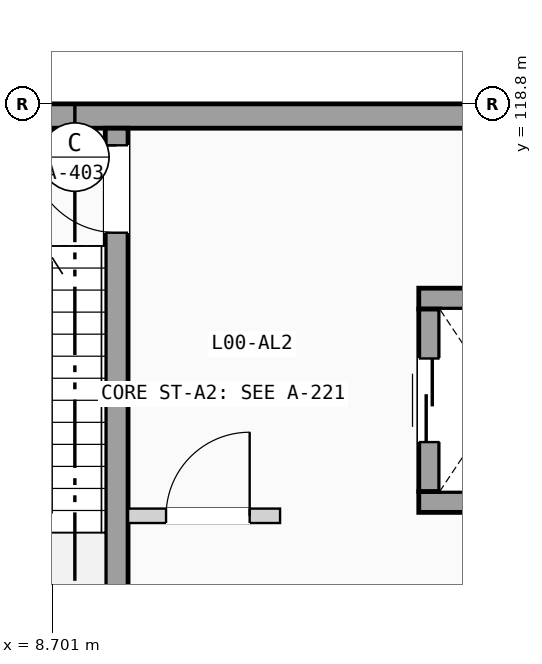
"""IFC4 building model, lengths in metres.
Left out: names, types, materials, properties, quantities, classifications, styles, units other than length and angle.
Written with IfcOpenShell. Run it as: python <this file> out.ifc"""

import sys

from ifc_helpers import new_model, si_unit, direction, frame, frame_2d, origin, place, context, subcontext, project, spatial, rectangle, extrude, element, fill, save


model = new_model("IFC4")
c1 = context("Model", 3, precision=1e-05, world=origin(), true_north=direction((0.0, 1.0)))
c2 = subcontext(c1, "Body", "Model", "MODEL_VIEW")
j1 = project(units=[si_unit("LENGTHUNIT", "METRE"), si_unit("PLANEANGLEUNIT", "RADIAN")], contexts=[c1])
p1 = place(None, origin())
s1 = spatial("IfcSite", under=j1, at=p1, CompositionType="ELEMENT")
p2 = place(p1, origin())
s2 = spatial("IfcBuilding", under=s1, at=p2, CompositionType="ELEMENT")
p3 = place(p2, origin())
s3 = spatial("IfcBuildingStorey", under=s2, at=p3, CompositionType="ELEMENT", Elevation=0.0)
p4 = place(p3, frame((0.0, 118.64, 0.0), z_axis=(0.0, 0.0, 1.0), x_axis=(1.0, 0.0, 0.0)))
e1 = element("IfcWall", 1, at=p4, inside=s3, PredefinedType="SOLIDWALL", context=c2, shape_type="SweptSolid", body=[
    extrude(rectangle(XDim=21.6, YDim=0.32, at=frame_2d((10.8, 0.0))), origin(), (0.0, 0.0, 1.0), 4.64),
])
p5 = place(p4, frame((7.25, 0.0, 0.0)))
e2 = element("IfcOpeningElement", 2, at=p5, cuts=e1, PredefinedType="OPENING", context=c2, shape_type="SweptSolid", body=[
    extrude(rectangle(XDim=1.3, YDim=2.2, at=frame_2d((0.65, 1.1))), frame((0.0, 0.17, 0.0), z_axis=(0.0, -1.0, 0.0), x_axis=(1.0, 0.0, 0.0)), (0.0, 0.0, 1.0), 0.34),
])
p6 = place(p3, frame((9.55, 111.48, 0.0), z_axis=(0.0, 0.0, 1.0), x_axis=(0.0, 1.0, 0.0)))
e3 = element("IfcWall", 3, at=p6, inside=s3, PredefinedType="SHEAR", context=c2, shape_type="SweptSolid", body=[
    extrude(rectangle(XDim=7.0, YDim=0.3, at=frame_2d((3.5, 0.0))), origin(), (0.0, 0.0, 1.0), 4.64),
])
p7 = place(p6, frame((5.625, 0.0, 0.0)))
e4 = element("IfcOpeningElement", 4, at=p7, cuts=e3, PredefinedType="OPENING", context=c2, shape_type="SweptSolid", body=[
    extrude(rectangle(XDim=1.15, YDim=2.12, at=frame_2d((0.575, 1.06))), frame((0.0, 0.16, 0.0), z_axis=(0.0, -1.0, 0.0), x_axis=(1.0, 0.0, 0.0)), (0.0, 0.0, 1.0), 0.32),
])
for number, where, z_axis, x_axis in (
    (5, (13.525, 113.562, 0.0), (0.0, 0.0, 1.0), (1.0, 0.0, 0.0)),
    (6, (13.525, 116.238, 0.0), (0.0, 0.0, 1.0), (1.0, 0.0, 0.0)),
):
    element("IfcWall", number, at=place(p3, frame(where, z_axis=z_axis, x_axis=x_axis)), inside=s3, PredefinedType="SHEAR", context=c2, shape_type="SweptSolid", body=[
        extrude(rectangle(XDim=2.15, YDim=0.275, at=frame_2d((1.075, 0.0))), origin(), (0.0, 0.0, 1.0), 4.64),
    ])
p8 = place(p3, frame((13.663, 113.7, 0.0), z_axis=(0.0, 0.0, 1.0), x_axis=(0.0, 1.0, 0.0)))
e7 = element("IfcWall", 7, at=p8, inside=s3, PredefinedType="SHEAR", context=c2, shape_type="SweptSolid", body=[
    extrude(rectangle(XDim=2.4, YDim=0.275, at=frame_2d((1.2, 0.0))), origin(), (0.0, 0.0, 1.0), 4.64),
])
p9 = place(p8, frame((0.65, 0.0, 0.0)))
e8 = element("IfcOpeningElement", 8, at=p9, cuts=e7, PredefinedType="OPENING", context=c2, shape_type="SweptSolid", body=[
    extrude(rectangle(XDim=1.1, YDim=2.15, at=frame_2d((0.55, 1.075))), frame((0.0, 0.147, 0.0), z_axis=(0.0, -1.0, 0.0), x_axis=(1.0, 0.0, 0.0)), (0.0, 0.0, 1.0), 0.295),
])
p10 = place(p3, frame((9.7, 113.38, 0.0), z_axis=(0.0, 0.0, 1.0), x_axis=(1.0, 0.0, 0.0)))
e9 = element("IfcWall", 9, at=p10, inside=s3, PredefinedType="PARTITIONING", context=c2, shape_type="SweptSolid", body=[
    extrude(rectangle(XDim=2.0, YDim=0.19, at=frame_2d((1.0, 0.0))), origin(), (0.0, 0.0, 1.0), 3.84),
])
p11 = place(p10, frame((0.5, 0.0, 0.0)))
e10 = element("IfcOpeningElement", 10, at=p11, cuts=e9, PredefinedType="OPENING", context=c2, shape_type="SweptSolid", body=[
    extrude(rectangle(XDim=1.1, YDim=2.12, at=frame_2d((0.55, 1.06))), frame((0.0, 0.105, 0.0), z_axis=(0.0, -1.0, 0.0), x_axis=(1.0, 0.0, 0.0)), (0.0, 0.0, 1.0), 0.21),
])
p12 = place(p7, origin())
e11 = element("IfcDoor", 11, at=p12, inside=s3, OperationType="SINGLE_SWING_RIGHT", PredefinedType="DOOR", context=c2, shape_type="SweptSolid", body=[
    extrude(rectangle(XDim=1.15, YDim=2.12, at=frame_2d((0.575, 1.06))), frame((0.0, 0.025, 0.0), z_axis=(0.0, -1.0, 0.0), x_axis=(1.0, 0.0, 0.0)), (0.0, 0.0, 1.0), 0.05),
])
fill(e4, e11)
p13 = place(p9, origin())
e12 = element("IfcDoor", 12, at=p13, inside=s3, OperationType="SLIDING_TO_LEFT", PredefinedType="DOOR", context=c2, shape_type="SweptSolid", body=[
    extrude(rectangle(XDim=1.1, YDim=2.15, at=frame_2d((0.55, 1.075))), frame((0.0, 0.025, 0.0), z_axis=(0.0, -1.0, 0.0), x_axis=(1.0, 0.0, 0.0)), (0.0, 0.0, 1.0), 0.05),
])
fill(e8, e12)
p14 = place(p11, origin())
e13 = element("IfcDoor", 13, at=p14, inside=s3, OperationType="SINGLE_SWING_RIGHT", PredefinedType="DOOR", context=c2, shape_type="SweptSolid", body=[
    extrude(rectangle(XDim=1.1, YDim=2.12, at=frame_2d((0.55, 1.06))), frame((0.0, 0.025, 0.0), z_axis=(0.0, -1.0, 0.0), x_axis=(1.0, 0.0, 0.0)), (0.0, 0.0, 1.0), 0.05),
])
fill(e10, e13)
save(model, sys.argv[1])
